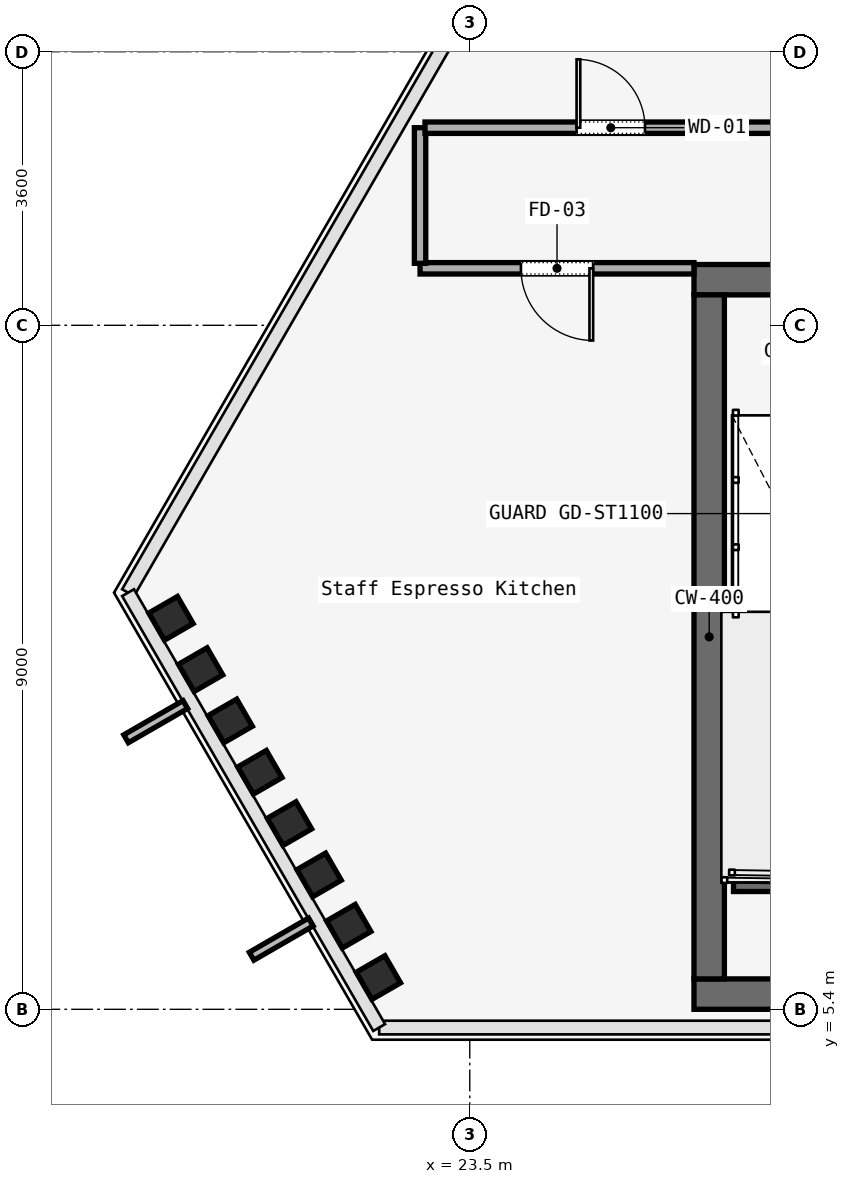
"""IFC4 building model, lengths in metres.
Left out: names, types, materials, properties, quantities, classifications, styles, units other than length and angle.
Written with IfcOpenShell. Run it as: python <this file> out.ifc"""

import sys

from ifc_helpers import new_model, si_unit, direction, frame, frame_2d, origin, origin_2d, place, context, subcontext, project, spatial, rectangle, i_section, extrude, element, fill, save


model = new_model("IFC4")
c1 = context("Model", 3, precision=1e-05, world=origin(), true_north=direction((0.0, 1.0)))
c2 = subcontext(c1, "Body", "Model", "MODEL_VIEW")
j1 = project(units=[si_unit("LENGTHUNIT", "METRE"), si_unit("PLANEANGLEUNIT", "RADIAN")], contexts=[c1])
p1 = place(None, origin())
s1 = spatial("IfcSite", under=j1, at=p1, CompositionType="ELEMENT")
p2 = place(p1, origin())
s2 = spatial("IfcBuilding", under=s1, at=p2, CompositionType="ELEMENT")
p3 = place(p2, frame((0.0, 0.0, 240.8)))
s3 = spatial("IfcBuildingStorey", under=s2, at=p3, CompositionType="ELEMENT", Elevation=240.8)
p4 = place(p3, frame((26.45, 15.0, 0.0), z_axis=(0.0, 0.0, 1.0), x_axis=(1.0, 0.0, 0.0)))
e1 = element("IfcWall", 1, at=p4, inside=s3, PredefinedType="SOLIDWALL", context=c2, shape_type="SweptSolid", body=[
    extrude(rectangle(XDim=31.1, YDim=0.4, at=frame_2d((15.55, 0.0))), origin(), (0.0, 0.0, 1.0), 3.58),
])
p5 = place(p4, frame((1.65, 0.0, 0.0)))
e2 = element("IfcOpeningElement", 2, at=p5, cuts=e1, PredefinedType="OPENING", context=c2, shape_type="SweptSolid", body=[
    extrude(rectangle(XDim=1.1, YDim=2.2, at=frame_2d((0.55, 1.1))), frame((0.0, 0.2, 0.0), z_axis=(0.0, -1.0, 0.0), x_axis=(1.0, 0.0, 0.0)), (0.0, 0.0, 1.0), 0.4),
])
p6 = place(p4, frame((13.65, 0.0, 0.0)))
e3 = element("IfcOpeningElement", 3, at=p6, cuts=e1, PredefinedType="OPENING", context=c2, shape_type="SweptSolid", body=[
    extrude(rectangle(XDim=1.1, YDim=2.2, at=frame_2d((0.55, 1.1))), frame((0.0, 0.2, 0.0), z_axis=(0.0, -1.0, 0.0), x_axis=(1.0, 0.0, 0.0)), (0.0, 0.0, 1.0), 0.4),
])
p7 = place(p4, frame((25.55, 0.0, 0.0)))
e4 = element("IfcOpeningElement", 4, at=p7, cuts=e1, PredefinedType="OPENING", context=c2, shape_type="SweptSolid", body=[
    extrude(rectangle(XDim=1.1, YDim=2.2, at=frame_2d((0.55, 1.1))), frame((0.0, 0.2, 0.0), z_axis=(0.0, -1.0, 0.0), x_axis=(1.0, 0.0, 0.0)), (0.0, 0.0, 1.0), 0.4),
])
p8 = place(p4, frame((19.35, 0.0, 0.0)))
e5 = element("IfcOpeningElement", 5, at=p8, cuts=e1, PredefinedType="OPENING", context=c2, shape_type="SweptSolid", body=[
    extrude(rectangle(XDim=1.1, YDim=2.2, at=frame_2d((0.55, 1.1))), frame((0.0, 0.2, 0.0), z_axis=(0.0, -1.0, 0.0), x_axis=(1.0, 0.0, 0.0)), (0.0, 0.0, 1.0), 0.4),
])
p9 = place(p4, frame((21.4, 0.0, 0.0)))
e6 = element("IfcOpeningElement", 6, at=p9, cuts=e1, PredefinedType="OPENING", context=c2, shape_type="SweptSolid", body=[
    extrude(rectangle(XDim=0.9, YDim=2.1, at=frame_2d((0.45, 1.05))), frame((0.0, 0.2, 0.0), z_axis=(0.0, -1.0, 0.0), x_axis=(1.0, 0.0, 0.0)), (0.0, 0.0, 1.0), 0.4),
])
p10 = place(p4, frame((6.04, 0.0, 0.0)))
e7 = element("IfcOpeningElement", 7, at=p10, cuts=e1, PredefinedType="OPENING", context=c2, shape_type="SweptSolid", body=[
    extrude(rectangle(XDim=0.95, YDim=2.2, at=frame_2d((0.475, 1.1))), frame((0.0, 0.2, 0.0), z_axis=(0.0, -1.0, 0.0), x_axis=(1.0, 0.0, 0.0)), (0.0, 0.0, 1.0), 0.4),
])
p11 = place(p4, frame((9.99, 0.0, 0.0)))
e8 = element("IfcOpeningElement", 8, at=p11, cuts=e1, PredefinedType="OPENING", context=c2, shape_type="SweptSolid", body=[
    extrude(rectangle(XDim=0.95, YDim=2.2, at=frame_2d((0.475, 1.1))), frame((0.0, 0.2, 0.0), z_axis=(0.0, -1.0, 0.0), x_axis=(1.0, 0.0, 0.0)), (0.0, 0.0, 1.0), 0.4),
])
p12 = place(p4, frame((23.35, 0.0, 0.0)))
e9 = element("IfcOpeningElement", 9, at=p12, cuts=e1, PredefinedType="OPENING", context=c2, shape_type="SweptSolid", body=[
    extrude(rectangle(XDim=1.3, YDim=2.3, at=frame_2d((0.65, 1.15))), frame((0.0, 0.2, 0.0), z_axis=(0.0, -1.0, 0.0), x_axis=(1.0, 0.0, 0.0)), (0.0, 0.0, 1.0), 0.4),
])
p13 = place(p3, frame((26.45, 5.6, 0.0), z_axis=(0.0, 0.0, 1.0), x_axis=(1.0, 0.0, 0.0)))
e10 = element("IfcWall", 10, at=p13, inside=s3, PredefinedType="SOLIDWALL", context=c2, shape_type="SweptSolid", body=[
    extrude(rectangle(XDim=31.1, YDim=0.4, at=frame_2d((15.55, 0.0))), origin(), (0.0, 0.0, 1.0), 3.58),
])
p14 = place(p3, frame((26.65, 5.8, 0.0), z_axis=(0.0, 0.0, 1.0), x_axis=(0.0, 1.0, 0.0)))
e11 = element("IfcWall", 11, at=p14, inside=s3, PredefinedType="SOLIDWALL", context=c2, shape_type="SweptSolid", body=[
    extrude(rectangle(XDim=9.0, YDim=0.4, at=frame_2d((4.5, 0.0))), origin(), (0.0, 0.0, 1.0), 3.58),
])
for number, where, z_axis, x_axis in (
    (12, (19.569, 10.544, 0.0), (0.0, 0.0, 1.0), (-0.5, 0.866, 0.0)),
    (13, (19.959, 9.869, 0.0), (0.0, 0.0, 1.0), (-0.5, 0.866, 0.0)),
    (14, (20.348, 9.194, 0.0), (0.0, 0.0, 1.0), (-0.5, 0.866, 0.0)),
    (15, (20.738, 8.519, 0.0), (0.0, 0.0, 1.0), (-0.5, 0.866, 0.0)),
    (16, (21.128, 7.844, 0.0), (0.0, 0.0, 1.0), (-0.5, 0.866, 0.0)),
    (17, (21.518, 7.168, 0.0), (0.0, 0.0, 1.0), (-0.5, 0.866, 0.0)),
    (18, (21.908, 6.493, 0.0), (0.0, 0.0, 1.0), (-0.5, 0.866, 0.0)),
    (19, (22.298, 5.818, 0.0), (0.0, 0.0, 1.0), (-0.5, 0.866, 0.0)),
):
    element("IfcColumn", number, at=place(p3, frame(where, z_axis=z_axis, x_axis=x_axis)), inside=s3, PredefinedType="COLUMN", context=c2, shape_type="SweptSolid", body=[
        extrude(i_section(OverallWidth=0.412, OverallDepth=0.435, WebThickness=0.036, FlangeThickness=0.044, FilletRadius=0.015, at=origin_2d()), origin(), (0.0, 0.0, 1.0), 3.58),
    ])
p15 = place(p3, frame((26.97, 7.05, 0.0), z_axis=(0.0, 0.0, 1.0), x_axis=(1.0, 0.0, 0.0)))
e20 = element("IfcWall", 20, at=p15, inside=s3, PredefinedType="SOLIDWALL", context=c2, shape_type="SweptSolid", body=[
    extrude(rectangle(XDim=3.115, YDim=0.2, at=frame_2d((1.558, 0.0))), origin(), (0.0, 0.0, 1.0), 3.8),
])
p16 = place(p3, frame((26.45, 15.15, 0.0), z_axis=(0.0, 0.0, 1.0), x_axis=(-1.0, 0.0, 0.0)))
e21 = element("IfcWall", 21, at=p16, inside=s3, PredefinedType="PARTITIONING", context=c2, shape_type="SweptSolid", body=[
    extrude(rectangle(XDim=3.604, YDim=0.15, at=frame_2d((1.802, 0.0))), origin(), (0.0, 0.0, 1.0), 3.01),
])
p17 = place(p16, frame((1.327, 0.0, 0.0)))
e22 = element("IfcOpeningElement", 22, at=p17, cuts=e21, PredefinedType="OPENING", context=c2, shape_type="SweptSolid", body=[
    extrude(rectangle(XDim=0.95, YDim=2.2, at=frame_2d((0.475, 1.1))), frame((0.0, 0.075, 0.0), z_axis=(0.0, -1.0, 0.0), x_axis=(1.0, 0.0, 0.0)), (0.0, 0.0, 1.0), 0.15),
])
p18 = place(p3, frame((22.846, 15.215, 0.0), z_axis=(0.0, 0.0, 1.0), x_axis=(0.0, 1.0, 0.0)))
e23 = element("IfcWall", 23, at=p18, inside=s3, PredefinedType="PARTITIONING", context=c2, shape_type="SweptSolid", body=[
    extrude(rectangle(XDim=1.785, YDim=0.15, at=frame_2d((0.893, 0.0))), origin(), (0.0, 0.0, 1.0), 3.01),
])
p19 = place(p3, frame((22.911, 17.0, 0.0), z_axis=(0.0, 0.0, 1.0), x_axis=(1.0, 0.0, 0.0)))
e24 = element("IfcWall", 24, at=p19, inside=s3, PredefinedType="PARTITIONING", context=c2, shape_type="SweptSolid", body=[
    extrude(rectangle(XDim=4.889, YDim=0.15, at=frame_2d((2.445, 0.0))), origin(), (0.0, 0.0, 1.0), 3.01),
])
p20 = place(p19, frame((1.994, 0.0, 0.0)))
e25 = element("IfcOpeningElement", 25, at=p20, cuts=e24, PredefinedType="OPENING", context=c2, shape_type="SweptSolid", body=[
    extrude(rectangle(XDim=0.9, YDim=2.15, at=frame_2d((0.45, 1.075))), frame((0.0, 0.075, 0.0), z_axis=(0.0, -1.0, 0.0), x_axis=(1.0, 0.0, 0.0)), (0.0, 0.0, 1.0), 0.15),
])
p21 = place(p17, origin())
e26 = element("IfcDoor", 26, at=p21, inside=s3, OperationType="SINGLE_SWING_LEFT", PredefinedType="DOOR", context=c2, shape_type="SweptSolid", body=[
    extrude(rectangle(XDim=0.95, YDim=2.2, at=frame_2d((0.475, 1.1))), frame((0.0, 0.025, 0.0), z_axis=(0.0, -1.0, 0.0), x_axis=(1.0, 0.0, 0.0)), (0.0, 0.0, 1.0), 0.05),
])
fill(e22, e26)
p22 = place(p20, origin())
e27 = element("IfcDoor", 27, at=p22, inside=s3, OperationType="SINGLE_SWING_RIGHT", PredefinedType="DOOR", context=c2, shape_type="SweptSolid", body=[
    extrude(rectangle(XDim=0.9, YDim=2.15, at=frame_2d((0.45, 1.075))), frame((0.0, 0.025, 0.0), z_axis=(0.0, -1.0, 0.0), x_axis=(1.0, 0.0, 0.0)), (0.0, 0.0, 1.0), 0.05),
])
fill(e25, e27)
save(model, sys.argv[1])
